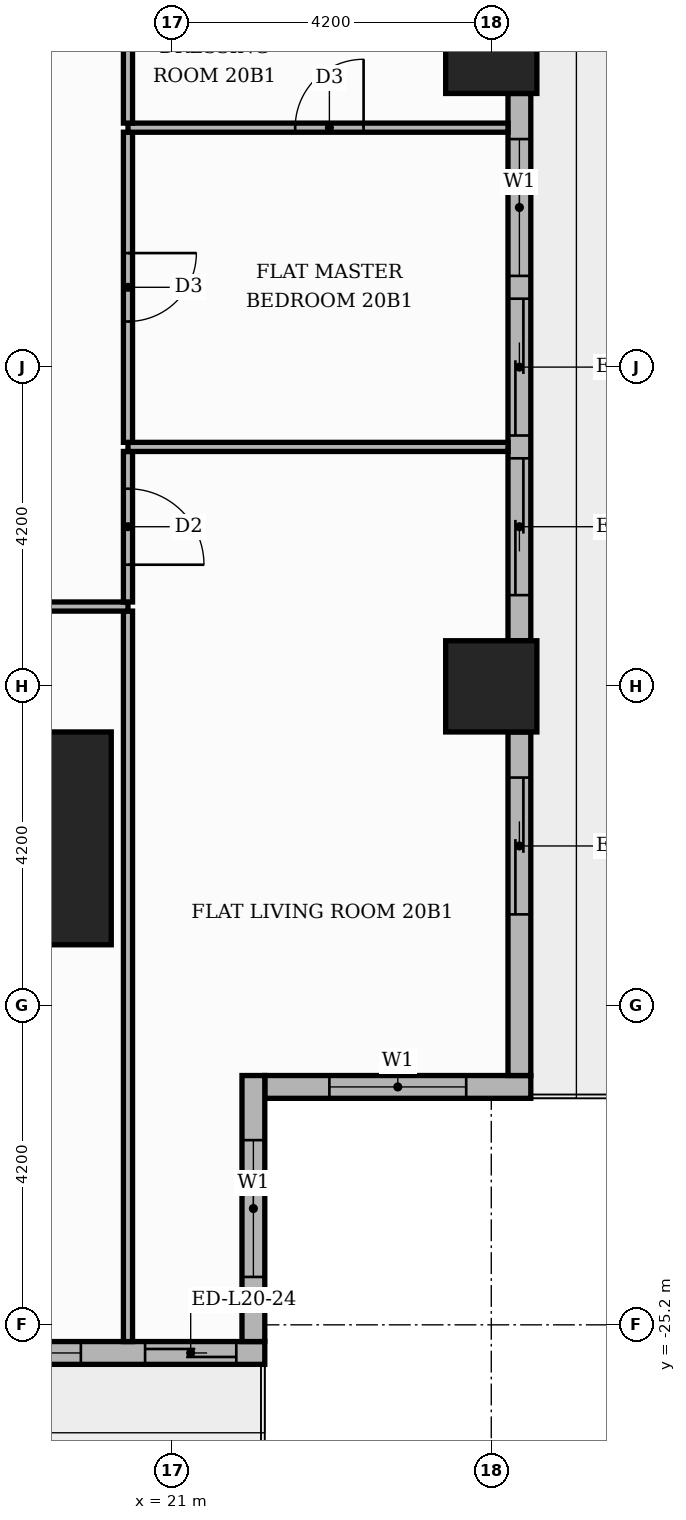
"""IFC4 building model, lengths in metres.
Left out: names, types, materials, properties, quantities, classifications, styles, units other than length and angle.
Written with IfcOpenShell. Run it as: python <this file> out.ifc"""

import sys

from ifc_helpers import new_model, si_unit, direction, frame, frame_2d, origin, origin_2d, place, context, subcontext, project, spatial, rectangle, extrude, element, fill, save


model = new_model("IFC4")
c1 = context("Model", 3, precision=1e-05, world=origin(), true_north=direction((0.0, 1.0)))
c2 = subcontext(c1, "Body", "Model", "MODEL_VIEW")
j1 = project(units=[si_unit("LENGTHUNIT", "METRE"), si_unit("PLANEANGLEUNIT", "RADIAN")], contexts=[c1])
p1 = place(None, origin())
s1 = spatial("IfcSite", under=j1, at=p1, CompositionType="ELEMENT")
p2 = place(p1, origin())
s2 = spatial("IfcBuilding", under=s1, at=p2, CompositionType="ELEMENT")
p3 = place(p2, frame((0.0, 0.0, 87.0)))
s3 = spatial("IfcBuildingStorey", under=s2, at=p3, CompositionType="ELEMENT", Elevation=87.0)
p4 = place(p3, frame((18.8, -18.8, 0.0), z_axis=(0.0, 0.0, 1.0), x_axis=(1.0, 0.0, 0.0)))
e1 = element("IfcColumn", 1, at=p4, inside=s3, PredefinedType="COLUMN", context=c2, shape_type="SweptSolid", body=[
    extrude(rectangle(XDim=2.8, YDim=2.8, at=origin_2d()), origin(), (0.0, 0.0, 1.0), 3.9),
])
for number, where, z_axis, x_axis in (
    (2, (25.2, -8.4, 0.0), (0.0, 0.0, 1.0), (1.0, 0.0, 0.0)),
    (3, (25.2, -16.8, 0.0), (0.0, 0.0, 1.0), (1.0, 0.0, 0.0)),
):
    element("IfcColumn", number, at=place(p3, frame(where, z_axis=z_axis, x_axis=x_axis)), inside=s3, PredefinedType="COLUMN", context=c2, shape_type="SweptSolid", body=[
        extrude(rectangle(XDim=1.2, YDim=1.2, at=origin_2d()), origin(), (0.0, 0.0, 1.0), 3.9),
    ])
p5 = place(p3, frame((22.22, -22.07, 0.0), z_axis=(0.0, 0.0, 1.0), x_axis=(1.0, 0.0, 0.0)))
e4 = element("IfcWall", 4, at=p5, inside=s3, PredefinedType="STANDARD", context=c2, shape_type="SweptSolid", body=[
    extrude(rectangle(XDim=3.5, YDim=0.3, at=frame_2d((1.75, 0.0))), origin(), (0.0, 0.0, 1.0), 3.48),
])
p6 = place(p5, frame((0.85, 0.0, 0.9)))
e5 = element("IfcOpeningElement", 5, at=p6, cuts=e4, PredefinedType="OPENING", context=c2, shape_type="SweptSolid", body=[
    extrude(rectangle(XDim=1.8, YDim=2.1, at=frame_2d((0.9, 1.05))), frame((0.0, 0.16, 0.0), z_axis=(0.0, -1.0, 0.0), x_axis=(1.0, 0.0, 0.0)), (0.0, 0.0, 1.0), 0.32),
])
p7 = place(p3, frame((25.57, -21.92, 0.0), z_axis=(0.0, 0.0, 1.0), x_axis=(0.0, 1.0, 0.0)))
e6 = element("IfcWall", 6, at=p7, inside=s3, PredefinedType="STANDARD", context=c2, shape_type="SweptSolid", body=[
    extrude(rectangle(XDim=4.52, YDim=0.3, at=frame_2d((2.26, 0.0))), origin(), (0.0, 0.0, 1.0), 3.48),
])
p8 = place(p7, frame((2.12, 0.0, 0.0)))
e7 = element("IfcOpeningElement", 7, at=p8, cuts=e6, PredefinedType="OPENING", context=c2, shape_type="SweptSolid", body=[
    extrude(rectangle(XDim=1.8, YDim=2.4, at=frame_2d((0.9, 1.2))), frame((0.0, 0.16, 0.0), z_axis=(0.0, -1.0, 0.0), x_axis=(1.0, 0.0, 0.0)), (0.0, 0.0, 1.0), 0.32),
])
p9 = place(p3, frame((25.57, -16.2, 0.0), z_axis=(0.0, 0.0, 1.0), x_axis=(0.0, 1.0, 0.0)))
e8 = element("IfcWall", 8, at=p9, inside=s3, PredefinedType="STANDARD", context=c2, shape_type="SweptSolid", body=[
    extrude(rectangle(XDim=7.2, YDim=0.3, at=frame_2d((3.6, 0.0))), origin(), (0.0, 0.0, 1.0), 3.48),
])
p10 = place(p9, frame((0.6, 0.0, 0.0)))
e9 = element("IfcOpeningElement", 9, at=p10, cuts=e8, PredefinedType="OPENING", context=c2, shape_type="SweptSolid", body=[
    extrude(rectangle(XDim=1.8, YDim=2.4, at=frame_2d((0.9, 1.2))), frame((0.0, 0.16, 0.0), z_axis=(0.0, -1.0, 0.0), x_axis=(1.0, 0.0, 0.0)), (0.0, 0.0, 1.0), 0.32),
])
p11 = place(p9, frame((2.7, 0.0, 0.0)))
e10 = element("IfcOpeningElement", 10, at=p11, cuts=e8, PredefinedType="OPENING", context=c2, shape_type="SweptSolid", body=[
    extrude(rectangle(XDim=1.8, YDim=2.4, at=frame_2d((0.9, 1.2))), frame((0.0, 0.16, 0.0), z_axis=(0.0, -1.0, 0.0), x_axis=(1.0, 0.0, 0.0)), (0.0, 0.0, 1.0), 0.32),
])
p12 = place(p9, frame((4.8, 0.0, 0.9)))
e11 = element("IfcOpeningElement", 11, at=p12, cuts=e8, PredefinedType="OPENING", context=c2, shape_type="SweptSolid", body=[
    extrude(rectangle(XDim=1.8, YDim=2.1, at=frame_2d((0.9, 1.05))), frame((0.0, 0.16, 0.0), z_axis=(0.0, -1.0, 0.0), x_axis=(1.0, 0.0, 0.0)), (0.0, 0.0, 1.0), 0.32),
])
p13 = place(p3, frame((17.4, -25.57, 0.0), z_axis=(0.0, 0.0, 1.0), x_axis=(1.0, 0.0, 0.0)))
e12 = element("IfcWall", 12, at=p13, inside=s3, PredefinedType="STANDARD", context=c2, shape_type="SweptSolid", body=[
    extrude(rectangle(XDim=4.82, YDim=0.3, at=frame_2d((2.41, 0.0))), origin(), (0.0, 0.0, 1.0), 3.48),
])
p14 = place(p13, frame((0.6, 0.0, 0.9)))
e13 = element("IfcOpeningElement", 13, at=p14, cuts=e12, PredefinedType="OPENING", context=c2, shape_type="SweptSolid", body=[
    extrude(rectangle(XDim=1.8, YDim=2.1, at=frame_2d((0.9, 1.05))), frame((0.0, 0.16, 0.0), z_axis=(0.0, -1.0, 0.0), x_axis=(1.0, 0.0, 0.0)), (0.0, 0.0, 1.0), 0.32),
])
p15 = place(p13, frame((3.245, 0.0, 0.0)))
e14 = element("IfcOpeningElement", 14, at=p15, cuts=e12, PredefinedType="OPENING", context=c2, shape_type="SweptSolid", body=[
    extrude(rectangle(XDim=1.2, YDim=2.4, at=frame_2d((0.6, 1.2))), frame((0.0, 0.16, 0.0), z_axis=(0.0, -1.0, 0.0), x_axis=(1.0, 0.0, 0.0)), (0.0, 0.0, 1.0), 0.32),
])
p16 = place(p3, frame((22.07, -25.42, 0.0), z_axis=(0.0, 0.0, 1.0), x_axis=(0.0, 1.0, 0.0)))
e15 = element("IfcWall", 15, at=p16, inside=s3, PredefinedType="STANDARD", context=c2, shape_type="SweptSolid", body=[
    extrude(rectangle(XDim=3.5, YDim=0.3, at=frame_2d((1.75, 0.0))), origin(), (0.0, 0.0, 1.0), 3.48),
])
p17 = place(p16, frame((0.85, 0.0, 0.9)))
e16 = element("IfcOpeningElement", 16, at=p17, cuts=e15, PredefinedType="OPENING", context=c2, shape_type="SweptSolid", body=[
    extrude(rectangle(XDim=1.8, YDim=2.1, at=frame_2d((0.9, 1.05))), frame((0.0, 0.16, 0.0), z_axis=(0.0, -1.0, 0.0), x_axis=(1.0, 0.0, 0.0)), (0.0, 0.0, 1.0), 0.32),
])
p18 = place(p3, frame((20.42, -25.42, 0.0), z_axis=(0.0, 0.0, 1.0), x_axis=(0.0, 1.0, 0.0)))
e17 = element("IfcWall", 17, at=p18, inside=s3, PredefinedType="PARTITIONING", context=c2, shape_type="SweptSolid", body=[
    extrude(rectangle(XDim=9.61, YDim=0.12, at=frame_2d((4.805, 0.0))), origin(), (0.0, 0.0, 1.0), 3.48),
])
p19 = place(p3, frame((13.75, -15.75, 0.0), z_axis=(0.0, 0.0, 1.0), x_axis=(1.0, 0.0, 0.0)))
e18 = element("IfcWall", 18, at=p19, inside=s3, PredefinedType="PARTITIONING", context=c2, shape_type="SweptSolid", body=[
    extrude(rectangle(XDim=6.67, YDim=0.12, at=frame_2d((3.335, 0.0))), origin(), (0.0, 0.0, 1.0), 3.48),
])
p20 = place(p19, frame((2.785, 0.0, 0.0)))
e19 = element("IfcOpeningElement", 19, at=p20, cuts=e18, PredefinedType="OPENING", context=c2, shape_type="SweptSolid", body=[
    extrude(rectangle(XDim=1.0, YDim=2.1, at=frame_2d((0.5, 1.05))), frame((0.0, 0.07, 0.0), z_axis=(0.0, -1.0, 0.0), x_axis=(1.0, 0.0, 0.0)), (0.0, 0.0, 1.0), 0.14),
])
p21 = place(p3, frame((20.42, -15.69, 0.0), z_axis=(0.0, 0.0, 1.0), x_axis=(0.0, 1.0, 0.0)))
e20 = element("IfcWall", 20, at=p21, inside=s3, PredefinedType="PARTITIONING", context=c2, shape_type="SweptSolid", body=[
    extrude(rectangle(XDim=1.98, YDim=0.12, at=frame_2d((0.99, 0.0))), origin(), (0.0, 0.0, 1.0), 3.48),
])
p22 = place(p21, frame((0.49, 0.0, 0.0)))
e21 = element("IfcOpeningElement", 21, at=p22, cuts=e20, PredefinedType="OPENING", context=c2, shape_type="SweptSolid", body=[
    extrude(rectangle(XDim=1.0, YDim=2.1, at=frame_2d((0.5, 1.05))), frame((0.0, 0.07, 0.0), z_axis=(0.0, -1.0, 0.0), x_axis=(1.0, 0.0, 0.0)), (0.0, 0.0, 1.0), 0.14),
])
p23 = place(p3, frame((20.42, -13.65, 0.0), z_axis=(0.0, 0.0, 1.0), x_axis=(1.0, 0.0, 0.0)))
e22 = element("IfcWall", 22, at=p23, inside=s3, PredefinedType="PARTITIONING", context=c2, shape_type="SweptSolid", body=[
    extrude(rectangle(XDim=5.0, YDim=0.12, at=frame_2d((2.5, 0.0))), origin(), (0.0, 0.0, 1.0), 3.48),
])
p24 = place(p3, frame((20.42, -13.59, 0.0), z_axis=(0.0, 0.0, 1.0), x_axis=(0.0, 1.0, 0.0)))
e23 = element("IfcWall", 23, at=p24, inside=s3, PredefinedType="PARTITIONING", context=c2, shape_type="SweptSolid", body=[
    extrude(rectangle(XDim=4.08, YDim=0.12, at=frame_2d((2.04, 0.0))), origin(), (0.0, 0.0, 1.0), 3.48),
])
p25 = place(p24, frame((1.59, 0.0, 0.0)))
e24 = element("IfcOpeningElement", 24, at=p25, cuts=e23, PredefinedType="OPENING", context=c2, shape_type="SweptSolid", body=[
    extrude(rectangle(XDim=0.9, YDim=2.1, at=frame_2d((0.45, 1.05))), frame((0.0, 0.07, 0.0), z_axis=(0.0, -1.0, 0.0), x_axis=(1.0, 0.0, 0.0)), (0.0, 0.0, 1.0), 0.14),
])
p26 = place(p3, frame((20.42, -9.45, 0.0), z_axis=(0.0, 0.0, 1.0), x_axis=(1.0, 0.0, 0.0)))
e25 = element("IfcWall", 25, at=p26, inside=s3, PredefinedType="PARTITIONING", context=c2, shape_type="SweptSolid", body=[
    extrude(rectangle(XDim=5.0, YDim=0.12, at=frame_2d((2.5, 0.0))), origin(), (0.0, 0.0, 1.0), 3.48),
])
p27 = place(p26, frame((2.2, 0.0, 0.0)))
e26 = element("IfcOpeningElement", 26, at=p27, cuts=e25, PredefinedType="OPENING", context=c2, shape_type="SweptSolid", body=[
    extrude(rectangle(XDim=0.9, YDim=2.1, at=frame_2d((0.45, 1.05))), frame((0.0, 0.07, 0.0), z_axis=(0.0, -1.0, 0.0), x_axis=(1.0, 0.0, 0.0)), (0.0, 0.0, 1.0), 0.14),
])
p28 = place(p3, frame((20.42, -9.39, 0.0), z_axis=(0.0, 0.0, 1.0), x_axis=(0.0, 1.0, 0.0)))
e27 = element("IfcWall", 27, at=p28, inside=s3, PredefinedType="PARTITIONING", context=c2, shape_type="SweptSolid", body=[
    extrude(rectangle(XDim=1.98, YDim=0.12, at=frame_2d((0.99, 0.0))), origin(), (0.0, 0.0, 1.0), 3.48),
])
p29 = place(p6, origin())
e28 = element("IfcWindow", 28, at=p29, inside=s3, PartitioningType="SINGLE_PANEL", PredefinedType="WINDOW", context=c2, shape_type="SweptSolid", body=[
    extrude(rectangle(XDim=1.8, YDim=2.1, at=frame_2d((0.9, 1.05))), frame((0.0, 0.03, 0.0), z_axis=(0.0, -1.0, 0.0), x_axis=(1.0, 0.0, 0.0)), (0.0, 0.0, 1.0), 0.06),
])
fill(e5, e28)
p30 = place(p8, origin())
e29 = element("IfcDoor", 29, at=p30, inside=s3, OperationType="SLIDING_TO_RIGHT", PredefinedType="DOOR", context=c2, shape_type="SweptSolid", body=[
    extrude(rectangle(XDim=1.8, YDim=2.4, at=frame_2d((0.9, 1.2))), frame((0.0, 0.025, 0.0), z_axis=(0.0, -1.0, 0.0), x_axis=(1.0, 0.0, 0.0)), (0.0, 0.0, 1.0), 0.05),
])
fill(e7, e29)
p31 = place(p10, origin())
e30 = element("IfcDoor", 30, at=p31, inside=s3, OperationType="SLIDING_TO_LEFT", PredefinedType="DOOR", context=c2, shape_type="SweptSolid", body=[
    extrude(rectangle(XDim=1.8, YDim=2.4, at=frame_2d((0.9, 1.2))), frame((0.0, 0.025, 0.0), z_axis=(0.0, -1.0, 0.0), x_axis=(1.0, 0.0, 0.0)), (0.0, 0.0, 1.0), 0.05),
])
fill(e9, e30)
p32 = place(p11, origin())
e31 = element("IfcDoor", 31, at=p32, inside=s3, OperationType="SLIDING_TO_RIGHT", PredefinedType="DOOR", context=c2, shape_type="SweptSolid", body=[
    extrude(rectangle(XDim=1.8, YDim=2.4, at=frame_2d((0.9, 1.2))), frame((0.0, 0.025, 0.0), z_axis=(0.0, -1.0, 0.0), x_axis=(1.0, 0.0, 0.0)), (0.0, 0.0, 1.0), 0.05),
])
fill(e10, e31)
p33 = place(p12, origin())
e32 = element("IfcWindow", 32, at=p33, inside=s3, PartitioningType="SINGLE_PANEL", PredefinedType="WINDOW", context=c2, shape_type="SweptSolid", body=[
    extrude(rectangle(XDim=1.8, YDim=2.1, at=frame_2d((0.9, 1.05))), frame((0.0, 0.03, 0.0), z_axis=(0.0, -1.0, 0.0), x_axis=(1.0, 0.0, 0.0)), (0.0, 0.0, 1.0), 0.06),
])
fill(e11, e32)
p34 = place(p14, origin())
e33 = element("IfcWindow", 33, at=p34, inside=s3, PartitioningType="SINGLE_PANEL", PredefinedType="WINDOW", context=c2, shape_type="SweptSolid", body=[
    extrude(rectangle(XDim=1.8, YDim=2.1, at=frame_2d((0.9, 1.05))), frame((0.0, 0.03, 0.0), z_axis=(0.0, -1.0, 0.0), x_axis=(1.0, 0.0, 0.0)), (0.0, 0.0, 1.0), 0.06),
])
fill(e13, e33)
p35 = place(p15, origin())
e34 = element("IfcDoor", 34, at=p35, inside=s3, OperationType="SLIDING_TO_RIGHT", PredefinedType="DOOR", context=c2, shape_type="SweptSolid", body=[
    extrude(rectangle(XDim=1.2, YDim=2.4, at=frame_2d((0.6, 1.2))), frame((0.0, 0.025, 0.0), z_axis=(0.0, -1.0, 0.0), x_axis=(1.0, 0.0, 0.0)), (0.0, 0.0, 1.0), 0.05),
])
fill(e14, e34)
p36 = place(p17, origin())
e35 = element("IfcWindow", 35, at=p36, inside=s3, PartitioningType="SINGLE_PANEL", PredefinedType="WINDOW", context=c2, shape_type="SweptSolid", body=[
    extrude(rectangle(XDim=1.8, YDim=2.1, at=frame_2d((0.9, 1.05))), frame((0.0, 0.03, 0.0), z_axis=(0.0, -1.0, 0.0), x_axis=(1.0, 0.0, 0.0)), (0.0, 0.0, 1.0), 0.06),
])
fill(e16, e35)
p37 = place(p22, frame((1.0, 0.0, 0.0), z_axis=(0.0, 0.0, 1.0), x_axis=(-1.0, 0.0, 0.0)))
e36 = element("IfcDoor", 36, at=p37, inside=s3, OperationType="SINGLE_SWING_LEFT", PredefinedType="DOOR", context=c2, shape_type="SweptSolid", body=[
    extrude(rectangle(XDim=1.0, YDim=2.1, at=frame_2d((0.5, 1.05))), frame((0.0, 0.025, 0.0), z_axis=(0.0, -1.0, 0.0), x_axis=(1.0, 0.0, 0.0)), (0.0, 0.0, 1.0), 0.05),
])
fill(e21, e36)
p38 = place(p25, frame((0.9, 0.0, 0.0), z_axis=(0.0, 0.0, 1.0), x_axis=(-1.0, 0.0, 0.0)))
e37 = element("IfcDoor", 37, at=p38, inside=s3, OperationType="SINGLE_SWING_RIGHT", PredefinedType="DOOR", context=c2, shape_type="SweptSolid", body=[
    extrude(rectangle(XDim=0.9, YDim=2.1, at=frame_2d((0.45, 1.05))), frame((0.0, 0.025, 0.0), z_axis=(0.0, -1.0, 0.0), x_axis=(1.0, 0.0, 0.0)), (0.0, 0.0, 1.0), 0.05),
])
fill(e24, e37)
p39 = place(p27, origin())
e38 = element("IfcDoor", 38, at=p39, inside=s3, OperationType="SINGLE_SWING_RIGHT", PredefinedType="DOOR", context=c2, shape_type="SweptSolid", body=[
    extrude(rectangle(XDim=0.9, YDim=2.1, at=frame_2d((0.45, 1.05))), frame((0.0, 0.025, 0.0), z_axis=(0.0, -1.0, 0.0), x_axis=(1.0, 0.0, 0.0)), (0.0, 0.0, 1.0), 0.05),
])
fill(e26, e38)
save(model, sys.argv[1])
